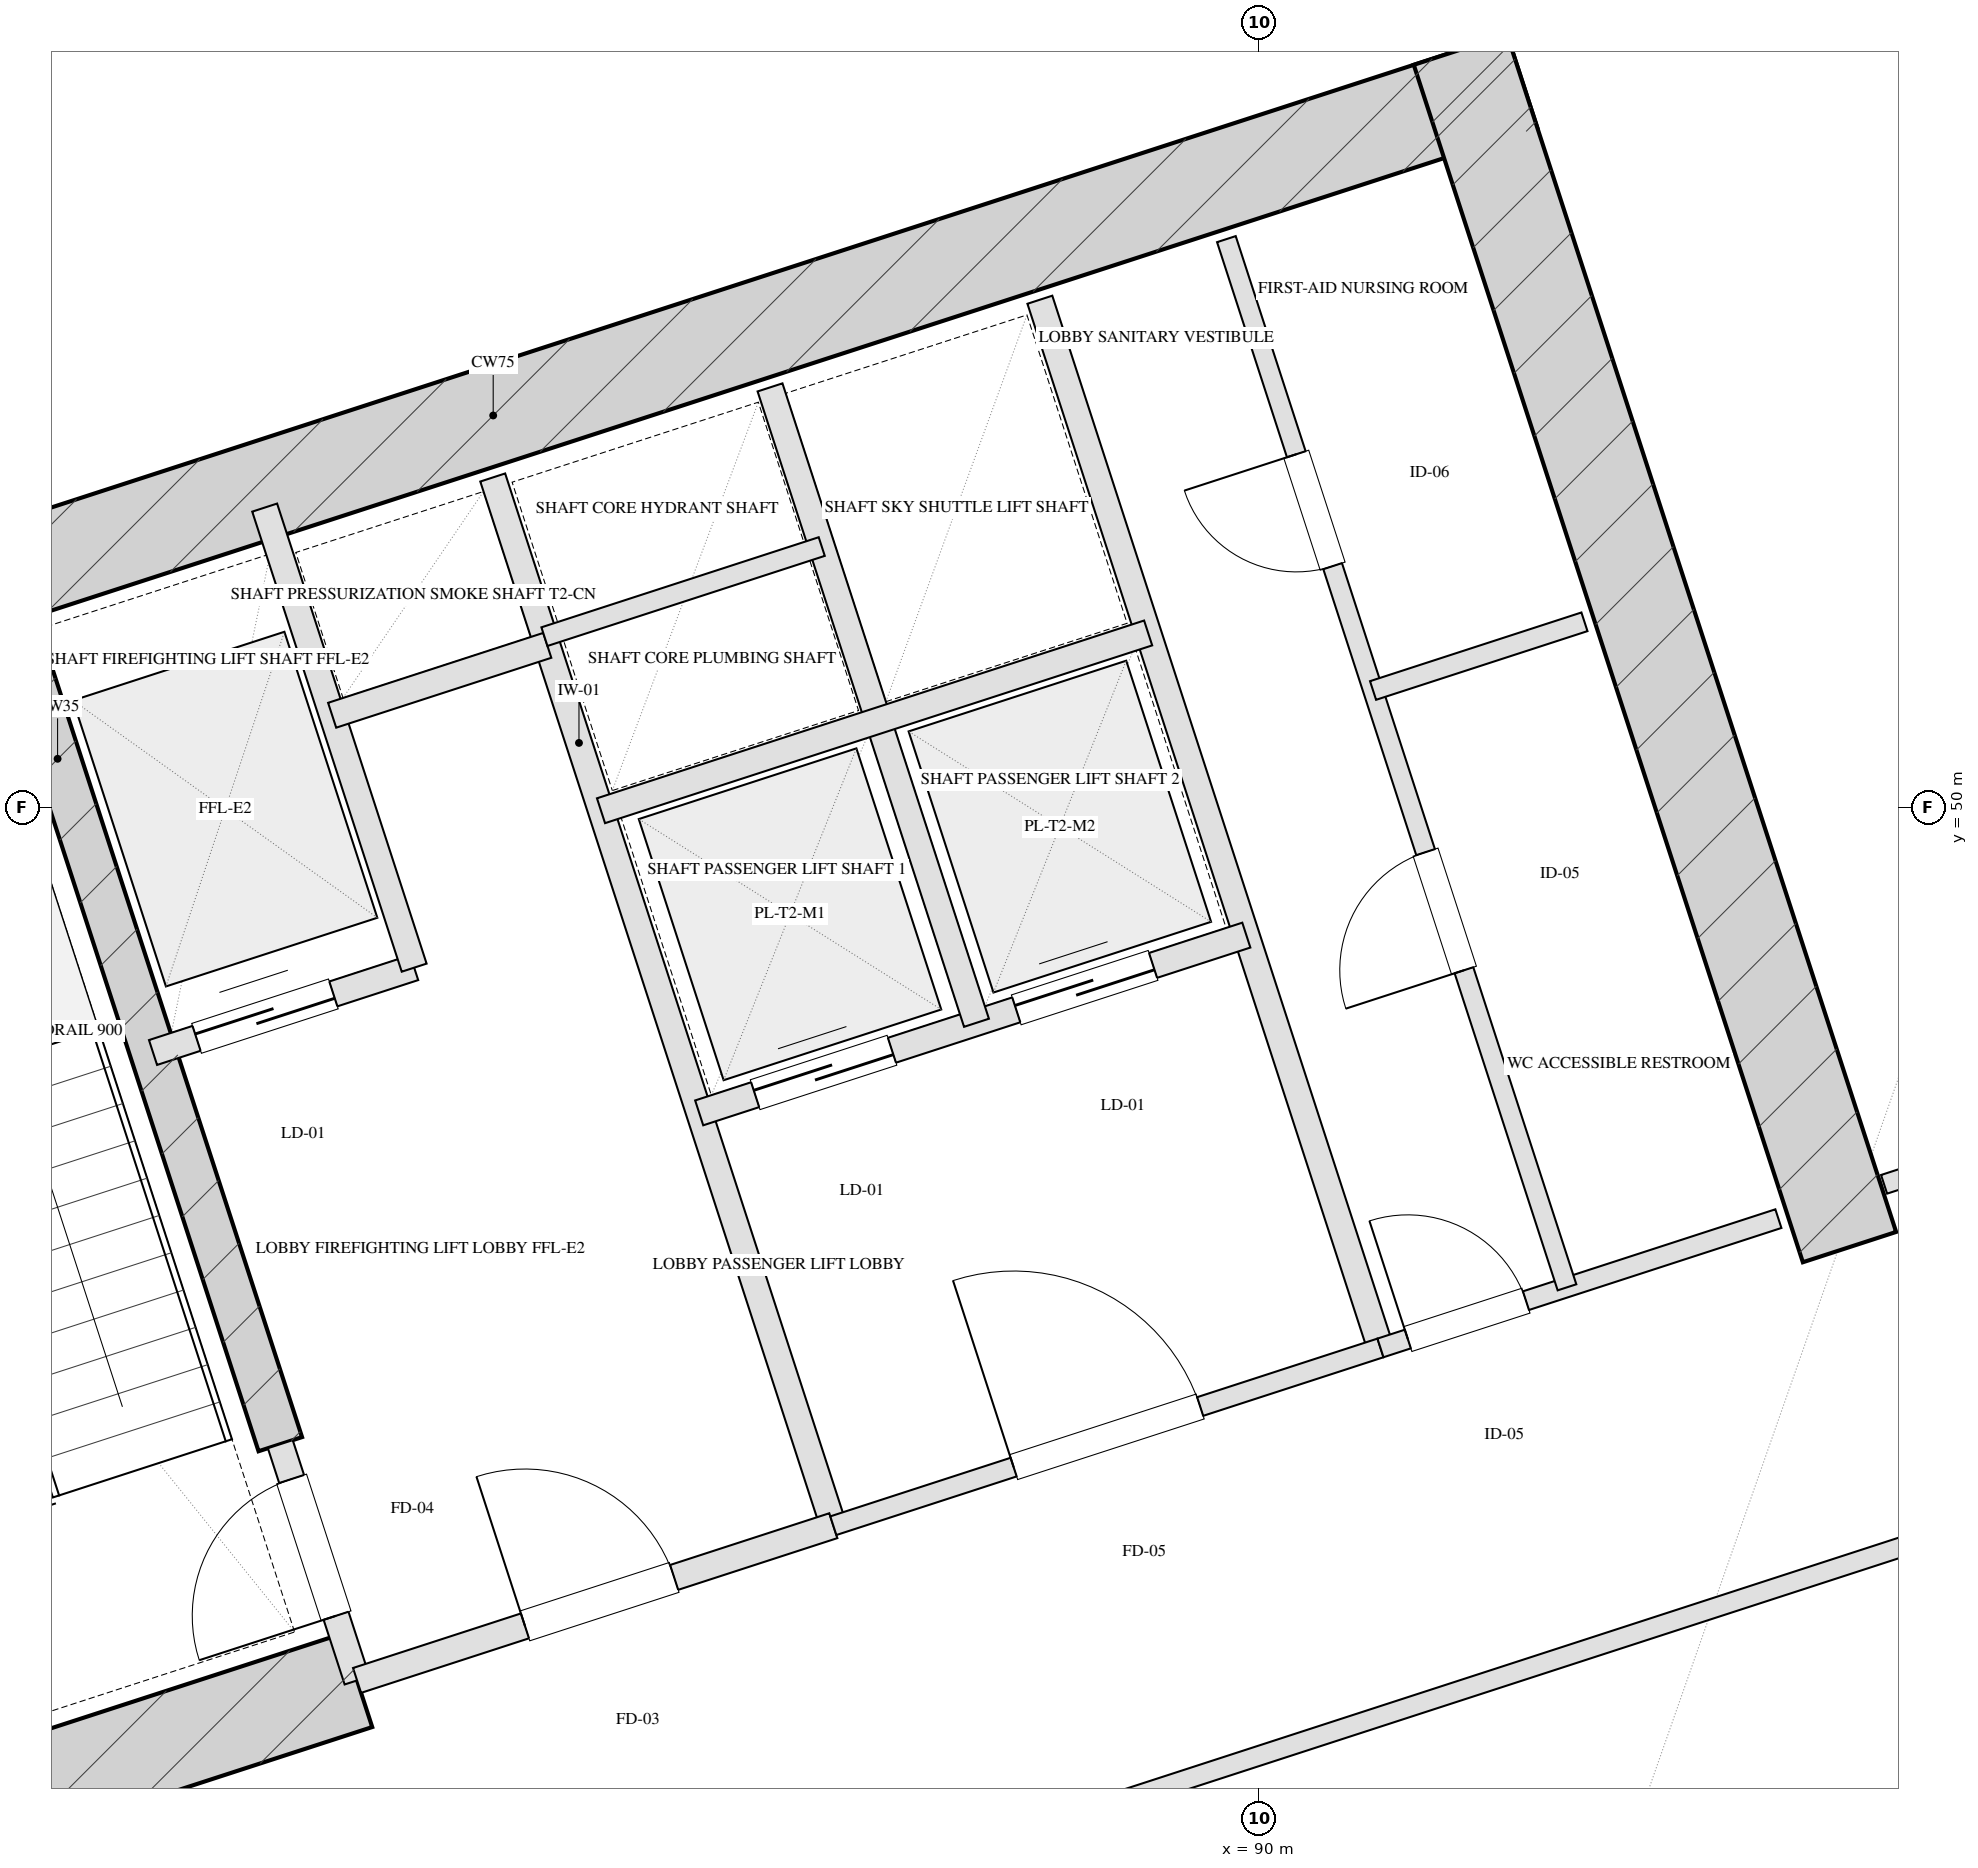
"""IFC4 building model, lengths in metres.
Left out: names, types, materials, properties, quantities, classifications, styles, units other than length and angle.
Written with IfcOpenShell. Run it as: python <this file> out.ifc"""

import sys

from ifc_helpers import new_model, si_unit, direction, frame, frame_2d, origin, place, context, subcontext, project, spatial, rectangle, extrude, element, fill, save


model = new_model("IFC4")
c1 = context("Model", 3, precision=1e-05, world=origin(), true_north=direction((0.0, 1.0)))
c2 = subcontext(c1, "Body", "Model", "MODEL_VIEW")
j1 = project(units=[si_unit("LENGTHUNIT", "METRE"), si_unit("PLANEANGLEUNIT", "RADIAN")], contexts=[c1])
p1 = place(None, origin())
s1 = spatial("IfcSite", under=j1, at=p1, CompositionType="ELEMENT")
p2 = place(p1, origin())
s2 = spatial("IfcBuilding", under=s1, at=p2, CompositionType="ELEMENT")
p3 = place(p2, frame((0.0, 0.0, 26.0)))
s3 = spatial("IfcBuildingStorey", under=s2, at=p3, CompositionType="ELEMENT", Elevation=26.0)
p4 = place(p3, frame((76.272, 50.443, 0.0), z_axis=(0.0, 0.0, 1.0), x_axis=(0.951056072937, 0.309018358888, 0.0)))
e1 = element("IfcWall", 1, at=p4, inside=s3, PredefinedType="SHEAR", context=c2, shape_type="SweptSolid", body=[
    extrude(rectangle(XDim=16.55, YDim=0.75, at=frame_2d((8.275, 0.0))), origin(), (0.0, 0.0, 1.0), 4.0),
])
p5 = place(p3, frame((94.515, 46.639, 0.0), z_axis=(0.0, 0.0, 1.0), x_axis=(-0.309016134813, 0.951056795583, 0.0)))
e2 = element("IfcWall", 2, at=p5, inside=s3, PredefinedType="SHEAR", context=c2, shape_type="SweptSolid", body=[
    extrude(rectangle(XDim=9.63, YDim=0.75, at=frame_2d((4.815, 0.0))), origin(), (0.0, 0.0, 1.0), 4.0),
])
p6 = place(p3, frame((82.514, 45.131, 0.0), z_axis=(0.0, 0.0, 1.0), x_axis=(-0.308988790936, 0.951065679686, 0.0)))
e3 = element("IfcWall", 3, at=p6, inside=s3, PredefinedType="SHEAR", context=c2, shape_type="SweptSolid", body=[
    extrude(rectangle(XDim=6.98, YDim=0.35, at=frame_2d((3.49, 0.0))), origin(), (0.0, 0.0, 1.0), 4.0),
])
p7 = place(p3, frame((79.016, 41.997, 0.0), z_axis=(0.0, 0.0, 1.0), x_axis=(0.95106038264, 0.309005094736, 0.0)))
e4 = element("IfcWall", 4, at=p7, inside=s3, PredefinedType="SHEAR", context=c2, shape_type="SweptSolid", body=[
    extrude(rectangle(XDim=4.295, YDim=0.75, at=frame_2d((2.147, 0.0))), origin(), (0.0, 0.0, 1.0), 4.0),
])
p8 = place(p3, frame((66.002, 55.433, 0.0), z_axis=(0.0, 0.0, 1.0), x_axis=(0.951055939317, 0.309018770125, 0.0)))
e5 = element("IfcWall", 5, at=p8, inside=s3, PredefinedType="SOLIDWALL", context=c2, shape_type="SweptSolid", body=[
    extrude(rectangle(XDim=32.4, YDim=0.4, at=frame_2d((16.2, 0.0))), origin(), (0.0, 0.0, 1.0), 3.16),
])
p9 = place(p3, frame((83.101, 43.324, 0.0), z_axis=(0.0, 0.0, 1.0), x_axis=(-0.309048298632, 0.951046344356, 0.0)))
e6 = element("IfcWall", 6, at=p9, inside=s3, PredefinedType="PARTITIONING", context=c2, shape_type="SweptSolid", body=[
    extrude(rectangle(XDim=1.9, YDim=0.2, at=frame_2d((0.95, 0.0))), origin(), (0.0, 0.0, 1.0), 3.725),
])
p10 = place(p9, frame((0.52, 0.0, 0.0)))
e7 = element("IfcOpeningElement", 7, at=p10, cuts=e6, PredefinedType="OPENING", context=c2, shape_type="SweptSolid", body=[
    extrude(rectangle(XDim=1.1, YDim=2.05, at=frame_2d((0.55, 1.025))), frame((0.0, 0.11, 0.0), z_axis=(0.0, -1.0, 0.0), x_axis=(1.0, 0.0, 0.0)), (0.0, 0.0, 1.0), 0.22),
])
p11 = place(p3, frame((86.743, 44.508, 0.0), z_axis=(0.0, 0.0, 1.0), x_axis=(-0.309016001439, 0.951056838919, 0.0)))
e8 = element("IfcWall", 8, at=p11, inside=s3, PredefinedType="PARTITIONING", context=c2, shape_type="SweptSolid", body=[
    extrude(rectangle(XDim=8.43, YDim=0.2, at=frame_2d((4.215, 0.0))), origin(), (0.0, 0.0, 1.0), 3.725),
])
p12 = place(p3, frame((83.101, 43.324, 0.0), z_axis=(0.0, 0.0, 1.0), x_axis=(0.951052804469, 0.309028417967, 0.0)))
e9 = element("IfcWall", 9, at=p12, inside=s3, PredefinedType="PARTITIONING", context=c2, shape_type="SweptSolid", body=[
    extrude(rectangle(XDim=3.83, YDim=0.2, at=frame_2d((1.915, 0.0))), origin(), (0.0, 0.0, 1.0), 3.725),
])
p13 = place(p12, frame((1.35, 0.0, 0.0)))
e10 = element("IfcOpeningElement", 10, at=p13, cuts=e9, PredefinedType="OPENING", context=c2, shape_type="SweptSolid", body=[
    extrude(rectangle(XDim=1.2, YDim=2.05, at=frame_2d((0.6, 1.025))), frame((0.0, 0.11, 0.0), z_axis=(0.0, -1.0, 0.0), x_axis=(1.0, 0.0, 0.0)), (0.0, 0.0, 1.0), 0.22),
])
p14 = place(p3, frame((81.54, 48.127, 0.0), z_axis=(0.0, 0.0, 1.0), x_axis=(0.951062257173, 0.308999325213, 0.0)))
e11 = element("IfcWall", 11, at=p14, inside=s3, PredefinedType="PARTITIONING", context=c2, shape_type="SweptSolid", body=[
    extrude(rectangle(XDim=2.1, YDim=0.2, at=frame_2d((1.05, 0.0))), origin(), (0.0, 0.0, 1.0), 3.725),
])
p15 = place(p14, frame((0.35, 0.0, 0.0)))
e12 = element("IfcOpeningElement", 12, at=p15, cuts=e11, PredefinedType="OPENING", context=c2, shape_type="SweptSolid", body=[
    extrude(rectangle(XDim=1.1, YDim=2.05, at=frame_2d((0.55, 1.025))), frame((0.0, 0.11, 0.0), z_axis=(0.0, -1.0, 0.0), x_axis=(1.0, 0.0, 0.0)), (0.0, 0.0, 1.0), 0.22),
])
p16 = place(p3, frame((83.538, 48.776, 0.0), z_axis=(0.0, 0.0, 1.0), x_axis=(-0.3089935693, 0.951064127245, 0.0)))
e13 = element("IfcWall", 13, at=p16, inside=s3, PredefinedType="PARTITIONING", context=c2, shape_type="SweptSolid", body=[
    extrude(rectangle(XDim=3.7, YDim=0.2, at=frame_2d((1.85, 0.0))), origin(), (0.0, 0.0, 1.0), 3.725),
])
p17 = place(p3, frame((82.91, 50.707, 0.0), z_axis=(0.0, 0.0, 1.0), x_axis=(0.951041328149, 0.309063734775, 0.0)))
e14 = element("IfcWall", 14, at=p17, inside=s3, PredefinedType="PARTITIONING", context=c2, shape_type="SweptSolid", body=[
    extrude(rectangle(XDim=1.73, YDim=0.2, at=frame_2d((0.865, 0.0))), origin(), (0.0, 0.0, 1.0), 3.725),
])
p18 = place(p3, frame((90.928, 45.868, 0.0), z_axis=(0.0, 0.0, 1.0), x_axis=(-0.309042196757, 0.951048327176, 0.0)))
e15 = element("IfcWall", 15, at=p18, inside=s3, PredefinedType="PARTITIONING", context=c2, shape_type="SweptSolid", body=[
    extrude(rectangle(XDim=8.43, YDim=0.2, at=frame_2d((4.215, 0.0))), origin(), (0.0, 0.0, 1.0), 3.725),
])
p19 = place(p3, frame((86.743, 44.508, 0.0), z_axis=(0.0, 0.0, 1.0), x_axis=(0.951063829732, 0.308994485023, 0.0)))
e16 = element("IfcWall", 16, at=p19, inside=s3, PredefinedType="PARTITIONING", context=c2, shape_type="SweptSolid", body=[
    extrude(rectangle(XDim=4.4, YDim=0.15, at=frame_2d((2.2, 0.0))), origin(), (0.0, 0.0, 1.0), 3.725),
])
p20 = place(p19, frame((1.45, 0.0, 0.0)))
e17 = element("IfcOpeningElement", 17, at=p20, cuts=e16, PredefinedType="OPENING", context=c2, shape_type="SweptSolid", body=[
    extrude(rectangle(XDim=1.5, YDim=2.05, at=frame_2d((0.75, 1.025))), frame((0.0, 0.085, 0.0), z_axis=(0.0, -1.0, 0.0), x_axis=(1.0, 0.0, 0.0)), (0.0, 0.0, 1.0), 0.17),
])
p21 = place(p3, frame((85.718, 47.666, 0.0), z_axis=(0.0, 0.0, 1.0), x_axis=(0.951058531764, 0.30901079133, 0.0)))
e18 = element("IfcWall", 18, at=p21, inside=s3, PredefinedType="PARTITIONING", context=c2, shape_type="SweptSolid", body=[
    extrude(rectangle(XDim=4.4, YDim=0.2, at=frame_2d((2.2, 0.0))), origin(), (0.0, 0.0, 1.0), 3.725),
])
p22 = place(p21, frame((0.45, 0.0, 0.0)))
e19 = element("IfcOpeningElement", 19, at=p22, cuts=e18, PredefinedType="OPENING", context=c2, shape_type="SweptSolid", body=[
    extrude(rectangle(XDim=1.1, YDim=2.05, at=frame_2d((0.55, 1.025))), frame((0.0, 0.11, 0.0), z_axis=(0.0, -1.0, 0.0), x_axis=(1.0, 0.0, 0.0)), (0.0, 0.0, 1.0), 0.22),
])
p23 = place(p21, frame((2.55, 0.0, 0.0)))
e20 = element("IfcOpeningElement", 20, at=p23, cuts=e18, PredefinedType="OPENING", context=c2, shape_type="SweptSolid", body=[
    extrude(rectangle(XDim=1.1, YDim=2.05, at=frame_2d((0.55, 1.025))), frame((0.0, 0.11, 0.0), z_axis=(0.0, -1.0, 0.0), x_axis=(1.0, 0.0, 0.0)), (0.0, 0.0, 1.0), 0.22),
])
p24 = place(p3, frame((87.838, 48.354, 0.0), z_axis=(0.0, 0.0, 1.0), x_axis=(-0.3090093719, 0.951058992953, 0.0)))
e21 = element("IfcWall", 21, at=p24, inside=s3, PredefinedType="PARTITIONING", context=c2, shape_type="SweptSolid", body=[
    extrude(rectangle(XDim=5.11, YDim=0.2, at=frame_2d((2.555, 0.0))), origin(), (0.0, 0.0, 1.0), 3.725),
])
p25 = place(p3, frame((84.967, 49.977, 0.0), z_axis=(0.0, 0.0, 1.0), x_axis=(0.951063829732, 0.308994485023, 0.0)))
e22 = element("IfcWall", 22, at=p25, inside=s3, PredefinedType="PARTITIONING", context=c2, shape_type="SweptSolid", body=[
    extrude(rectangle(XDim=4.4, YDim=0.2, at=frame_2d((2.2, 0.0))), origin(), (0.0, 0.0, 1.0), 3.725),
])
p26 = place(p3, frame((84.534, 51.308, 0.0), z_axis=(0.0, 0.0, 1.0), x_axis=(0.951075093106, 0.308959814982, 0.0)))
e23 = element("IfcWall", 23, at=p26, inside=s3, PredefinedType="PARTITIONING", context=c2, shape_type="SweptSolid", body=[
    extrude(rectangle(XDim=2.23, YDim=0.15, at=frame_2d((1.115, 0.0))), origin(), (0.0, 0.0, 1.0), 3.725),
])
p27 = place(p3, frame((90.928, 45.868, 0.0), z_axis=(0.0, 0.0, 1.0), x_axis=(0.951059297078, 0.309008435874, 0.0)))
e24 = element("IfcWall", 24, at=p27, inside=s3, PredefinedType="PARTITIONING", context=c2, shape_type="SweptSolid", body=[
    extrude(rectangle(XDim=3.2, YDim=0.15, at=frame_2d((1.6, 0.0))), origin(), (0.0, 0.0, 1.0), 3.725),
])
p28 = place(p27, frame((0.22, 0.0, 0.0)))
e25 = element("IfcOpeningElement", 25, at=p28, cuts=e24, PredefinedType="OPENING", context=c2, shape_type="SweptSolid", body=[
    extrude(rectangle(XDim=0.95, YDim=2.05, at=frame_2d((0.475, 1.025))), frame((0.0, 0.085, 0.0), z_axis=(0.0, -1.0, 0.0), x_axis=(1.0, 0.0, 0.0)), (0.0, 0.0, 1.0), 0.17),
])
p29 = place(p3, frame((92.355, 46.331, 0.0), z_axis=(0.0, 0.0, 1.0), x_axis=(-0.309007490203, 0.951059604335, 0.0)))
e26 = element("IfcWall", 26, at=p29, inside=s3, PredefinedType="PARTITIONING", context=c2, shape_type="SweptSolid", body=[
    extrude(rectangle(XDim=8.43, YDim=0.15, at=frame_2d((4.215, 0.0))), origin(), (0.0, 0.0, 1.0), 3.725),
])
p30 = place(p29, frame((2.55, 0.0, 0.0)))
e27 = element("IfcOpeningElement", 27, at=p30, cuts=e26, PredefinedType="OPENING", context=c2, shape_type="SweptSolid", body=[
    extrude(rectangle(XDim=0.95, YDim=2.05, at=frame_2d((0.475, 1.025))), frame((0.0, 0.085, 0.0), z_axis=(0.0, -1.0, 0.0), x_axis=(1.0, 0.0, 0.0)), (0.0, 0.0, 1.0), 0.17),
])
p31 = place(p29, frame((5.8, 0.0, 0.0)))
e28 = element("IfcOpeningElement", 28, at=p31, cuts=e26, PredefinedType="OPENING", context=c2, shape_type="SweptSolid", body=[
    extrude(rectangle(XDim=0.9, YDim=2.05, at=frame_2d((0.45, 1.025))), frame((0.0, 0.085, 0.0), z_axis=(0.0, -1.0, 0.0), x_axis=(1.0, 0.0, 0.0)), (0.0, 0.0, 1.0), 0.17),
])
p32 = place(p3, frame((90.871, 50.896, 0.0), z_axis=(0.0, 0.0, 1.0), x_axis=(0.951054116971, 0.309024378638, 0.0)))
e29 = element("IfcWall", 29, at=p32, inside=s3, PredefinedType="PARTITIONING", context=c2, shape_type="SweptSolid", body=[
    extrude(rectangle(XDim=1.7, YDim=0.15, at=frame_2d((0.85, 0.0))), origin(), (0.0, 0.0, 1.0), 3.725),
])
p33 = place(p3, frame((94.78, 47.119, 0.0), z_axis=(0.0, 0.0, 1.0), x_axis=(0.951054294345, 0.309023832749, 0.0)))
e30 = element("IfcWall", 30, at=p33, inside=s3, PredefinedType="PARTITIONING", context=c2, shape_type="SweptSolid", body=[
    extrude(rectangle(XDim=10.2, YDim=0.15, at=frame_2d((5.1, 0.0))), origin(), (0.0, 0.0, 1.0), 3.725),
])
p34 = place(p33, frame((4.284, 0.0, 0.0)))
e31 = element("IfcOpeningElement", 31, at=p34, cuts=e30, PredefinedType="OPENING", context=c2, shape_type="SweptSolid", body=[
    extrude(rectangle(XDim=1.0, YDim=2.05, at=frame_2d((0.5, 1.025))), frame((0.0, 0.085, 0.0), z_axis=(0.0, -1.0, 0.0), x_axis=(1.0, 0.0, 0.0)), (0.0, 0.0, 1.0), 0.17),
])
for number, where, z_axis, x_axis in (
    (32, (86.692, 41.673, 0.0), (0.0, 0.0, 1.0), (0.951, 0.309, 0.0)),
    (33, (87.72, 38.508, 0.0), (0.0, 0.0, 1.0), (0.951, 0.309, 0.0)),
):
    element("IfcWall", number, at=place(p3, frame(where, z_axis=z_axis, x_axis=x_axis)), inside=s3, PredefinedType="PARTITIONING", context=c2, shape_type="SweptSolid", body=[
        extrude(rectangle(XDim=19.575, YDim=0.15, at=frame_2d((9.788, 0.0))), origin(), (0.0, 0.0, 1.0), 3.725),
    ])
p35 = place(p10, origin())
e34 = element("IfcDoor", 34, at=p35, inside=s3, OperationType="SINGLE_SWING_LEFT", PredefinedType="DOOR", context=c2, shape_type="SweptSolid", body=[
    extrude(rectangle(XDim=1.1, YDim=2.05, at=frame_2d((0.55, 1.025))), frame((0.0, 0.025, 0.0), z_axis=(0.0, -1.0, 0.0), x_axis=(1.0, 0.0, 0.0)), (0.0, 0.0, 1.0), 0.05),
])
fill(e7, e34)
p36 = place(p13, origin())
e35 = element("IfcDoor", 35, at=p36, inside=s3, OperationType="SINGLE_SWING_LEFT", PredefinedType="DOOR", context=c2, shape_type="SweptSolid", body=[
    extrude(rectangle(XDim=1.2, YDim=2.05, at=frame_2d((0.6, 1.025))), frame((0.0, 0.025, 0.0), z_axis=(0.0, -1.0, 0.0), x_axis=(1.0, 0.0, 0.0)), (0.0, 0.0, 1.0), 0.05),
])
fill(e10, e35)
p37 = place(p15, origin())
e36 = element("IfcDoor", 36, at=p37, inside=s3, OperationType="DOUBLE_DOOR_SLIDING", PredefinedType="DOOR", context=c2, shape_type="SweptSolid", body=[
    extrude(rectangle(XDim=1.1, YDim=2.05, at=frame_2d((0.55, 1.025))), frame((0.0, 0.025, 0.0), z_axis=(0.0, -1.0, 0.0), x_axis=(1.0, 0.0, 0.0)), (0.0, 0.0, 1.0), 0.05),
])
fill(e12, e36)
p38 = place(p20, origin())
e37 = element("IfcDoor", 37, at=p38, inside=s3, OperationType="SINGLE_SWING_LEFT", PredefinedType="DOOR", context=c2, shape_type="SweptSolid", body=[
    extrude(rectangle(XDim=1.5, YDim=2.05, at=frame_2d((0.75, 1.025))), frame((0.0, 0.025, 0.0), z_axis=(0.0, -1.0, 0.0), x_axis=(1.0, 0.0, 0.0)), (0.0, 0.0, 1.0), 0.05),
])
fill(e17, e37)
p39 = place(p22, origin())
e38 = element("IfcDoor", 38, at=p39, inside=s3, OperationType="DOUBLE_DOOR_SLIDING", PredefinedType="DOOR", context=c2, shape_type="SweptSolid", body=[
    extrude(rectangle(XDim=1.1, YDim=2.05, at=frame_2d((0.55, 1.025))), frame((0.0, 0.025, 0.0), z_axis=(0.0, -1.0, 0.0), x_axis=(1.0, 0.0, 0.0)), (0.0, 0.0, 1.0), 0.05),
])
fill(e19, e38)
p40 = place(p23, origin())
e39 = element("IfcDoor", 39, at=p40, inside=s3, OperationType="DOUBLE_DOOR_SLIDING", PredefinedType="DOOR", context=c2, shape_type="SweptSolid", body=[
    extrude(rectangle(XDim=1.1, YDim=2.05, at=frame_2d((0.55, 1.025))), frame((0.0, 0.025, 0.0), z_axis=(0.0, -1.0, 0.0), x_axis=(1.0, 0.0, 0.0)), (0.0, 0.0, 1.0), 0.05),
])
fill(e20, e39)
p41 = place(p28, origin())
e40 = element("IfcDoor", 40, at=p41, inside=s3, OperationType="SINGLE_SWING_LEFT", PredefinedType="DOOR", context=c2, shape_type="SweptSolid", body=[
    extrude(rectangle(XDim=0.95, YDim=2.05, at=frame_2d((0.475, 1.025))), frame((0.0, 0.025, 0.0), z_axis=(0.0, -1.0, 0.0), x_axis=(1.0, 0.0, 0.0)), (0.0, 0.0, 1.0), 0.05),
])
fill(e25, e40)
p42 = place(p30, origin())
e41 = element("IfcDoor", 41, at=p42, inside=s3, OperationType="SINGLE_SWING_LEFT", PredefinedType="DOOR", context=c2, shape_type="SweptSolid", body=[
    extrude(rectangle(XDim=0.95, YDim=2.05, at=frame_2d((0.475, 1.025))), frame((0.0, 0.025, 0.0), z_axis=(0.0, -1.0, 0.0), x_axis=(1.0, 0.0, 0.0)), (0.0, 0.0, 1.0), 0.05),
])
fill(e27, e41)
p43 = place(p31, origin())
e42 = element("IfcDoor", 42, at=p43, inside=s3, OperationType="SINGLE_SWING_RIGHT", PredefinedType="DOOR", context=c2, shape_type="SweptSolid", body=[
    extrude(rectangle(XDim=0.9, YDim=2.05, at=frame_2d((0.45, 1.025))), frame((0.0, 0.025, 0.0), z_axis=(0.0, -1.0, 0.0), x_axis=(1.0, 0.0, 0.0)), (0.0, 0.0, 1.0), 0.05),
])
fill(e28, e42)
save(model, sys.argv[1])
